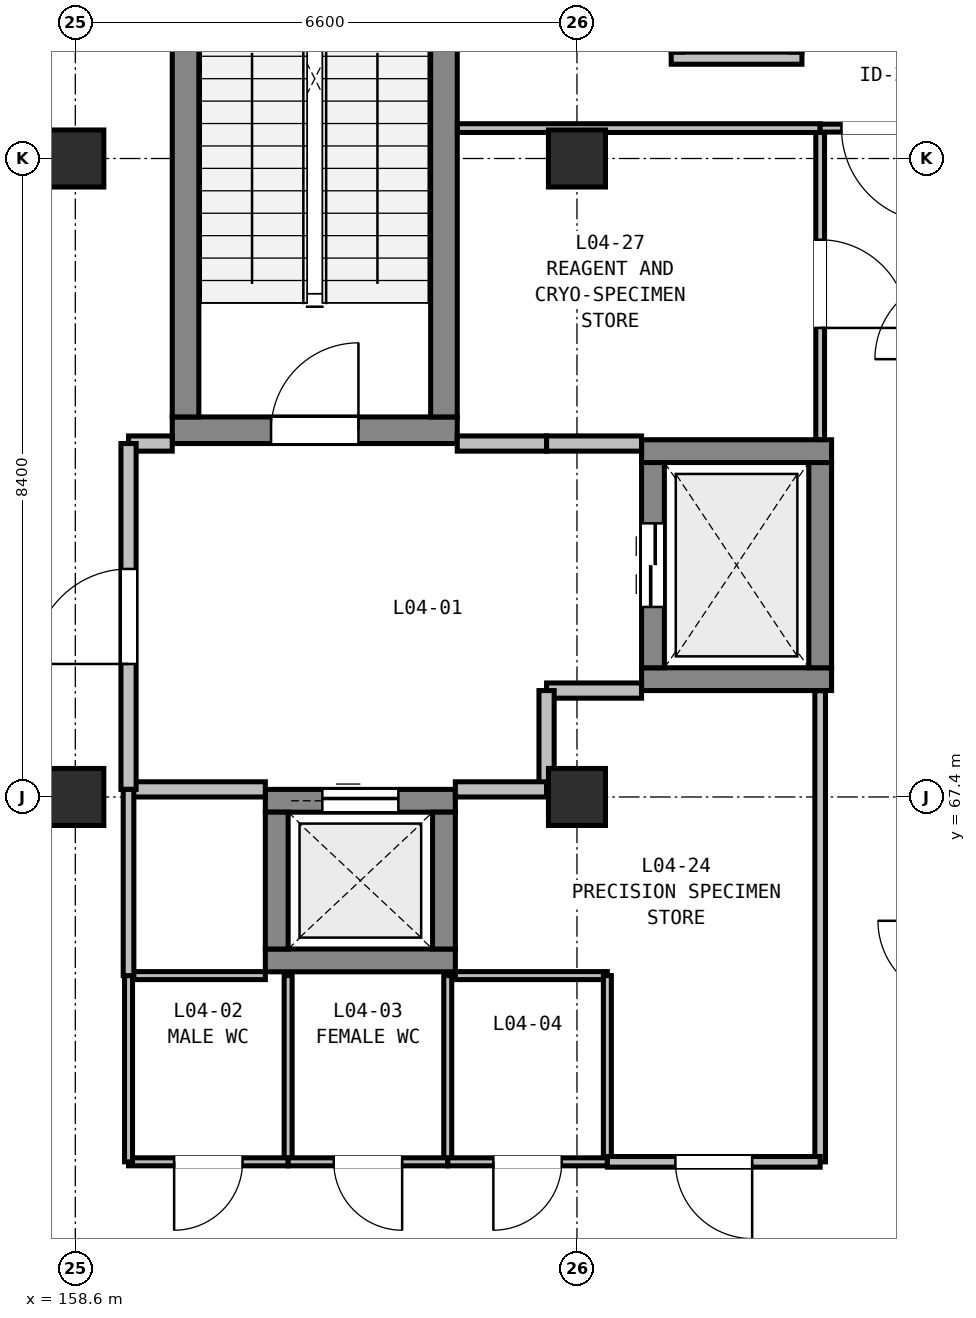
"""IFC4 building model, lengths in metres.
Left out: names, types, materials, properties, quantities, classifications, styles, units other than length and angle.
Written with IfcOpenShell. Run it as: python <this file> out.ifc"""

import sys

from ifc_helpers import new_model, si_unit, direction, frame, frame_2d, origin, origin_2d, place, context, subcontext, project, spatial, rectangle, extrude, element, fill, save


model = new_model("IFC4")
c1 = context("Model", 3, precision=1e-05, world=origin(), true_north=direction((0.0, 1.0)))
c2 = subcontext(c1, "Body", "Model", "MODEL_VIEW")
j1 = project(units=[si_unit("LENGTHUNIT", "METRE"), si_unit("PLANEANGLEUNIT", "RADIAN")], contexts=[c1])
p1 = place(None, origin())
s1 = spatial("IfcSite", under=j1, at=p1, CompositionType="ELEMENT")
p2 = place(p1, origin())
s2 = spatial("IfcBuilding", under=s1, at=p2, CompositionType="ELEMENT")
p3 = place(p2, frame((0.0, 0.0, 19.5)))
s3 = spatial("IfcBuildingStorey", under=s2, at=p3, CompositionType="ELEMENT", Elevation=19.5)
for number, where, z_axis, x_axis in (
    (1, (158.6, 67.4, 0.0), (0.0, 0.0, 1.0), (1.0, 0.0, 0.0)),
    (2, (158.6, 75.8, 0.0), (0.0, 0.0, 1.0), (1.0, 0.0, 0.0)),
    (3, (165.2, 67.4, 0.0), (0.0, 0.0, 1.0), (1.0, 0.0, 0.0)),
    (4, (165.2, 75.8, 0.0), (0.0, 0.0, 1.0), (1.0, 0.0, 0.0)),
):
    element("IfcColumn", number, at=place(p3, frame(where, z_axis=z_axis, x_axis=x_axis)), inside=s3, PredefinedType="COLUMN", context=c2, shape_type="SweptSolid", body=[
        extrude(rectangle(XDim=0.75, YDim=0.75, at=origin_2d()), origin(), (0.0, 0.0, 1.0), 4.5),
    ])
p4 = place(p3, frame((159.875, 72.225, 0.0), z_axis=(0.0, 0.0, 1.0), x_axis=(1.0, 0.0, 0.0)))
e5 = element("IfcWall", 5, at=p4, inside=s3, PredefinedType="SHEAR", context=c2, shape_type="SweptSolid", body=[
    extrude(rectangle(XDim=3.75, YDim=0.35, at=frame_2d((1.875, 0.0))), origin(), (0.0, 0.0, 1.0), 4.5),
])
p5 = place(p4, frame((1.3, 0.0, 0.0)))
e6 = element("IfcOpeningElement", 6, at=p5, cuts=e5, PredefinedType="OPENING", context=c2, shape_type="SweptSolid", body=[
    extrude(rectangle(XDim=1.15, YDim=2.15, at=frame_2d((0.575, 1.075))), frame((0.0, 0.185, 0.0), z_axis=(0.0, -1.0, 0.0), x_axis=(1.0, 0.0, 0.0)), (0.0, 0.0, 1.0), 0.37),
])
for number, where, z_axis, x_axis in (
    (7, (160.05, 72.4, 0.0), (0.0, 0.0, 1.0), (0.0, 1.0, 0.0)),
    (8, (163.45, 72.4, 0.0), (0.0, 0.0, 1.0), (0.0, 1.0, 0.0)),
):
    element("IfcWall", number, at=place(p3, frame(where, z_axis=z_axis, x_axis=x_axis)), inside=s3, PredefinedType="SHEAR", context=c2, shape_type="SweptSolid", body=[
        extrude(rectangle(XDim=7.375, YDim=0.35, at=frame_2d((3.688, 0.0))), origin(), (0.0, 0.0, 1.0), 4.5),
    ])
for number, where, z_axis, x_axis in (
    (9, (166.05, 68.95, 0.0), (0.0, 0.0, 1.0), (1.0, 0.0, 0.0)),
    (10, (166.05, 71.95, 0.0), (0.0, 0.0, 1.0), (1.0, 0.0, 0.0)),
):
    element("IfcWall", number, at=place(p3, frame(where, z_axis=z_axis, x_axis=x_axis)), inside=s3, PredefinedType="SHEAR", context=c2, shape_type="SweptSolid", body=[
        extrude(rectangle(XDim=2.5, YDim=0.3, at=frame_2d((1.25, 0.0))), origin(), (0.0, 0.0, 1.0), 4.5),
    ])
p6 = place(p3, frame((166.2, 69.1, 0.0), z_axis=(0.0, 0.0, 1.0), x_axis=(0.0, 1.0, 0.0)))
e11 = element("IfcWall", 11, at=p6, inside=s3, PredefinedType="SHEAR", context=c2, shape_type="SweptSolid", body=[
    extrude(rectangle(XDim=2.7, YDim=0.3, at=frame_2d((1.35, 0.0))), origin(), (0.0, 0.0, 1.0), 4.5),
])
p7 = place(p6, frame((0.8, 0.0, 0.0)))
e12 = element("IfcOpeningElement", 12, at=p7, cuts=e11, PredefinedType="OPENING", context=c2, shape_type="SweptSolid", body=[
    extrude(rectangle(XDim=1.1, YDim=2.1, at=frame_2d((0.55, 1.05))), frame((0.0, 0.16, 0.0), z_axis=(0.0, -1.0, 0.0), x_axis=(1.0, 0.0, 0.0)), (0.0, 0.0, 1.0), 0.32),
])
p8 = place(p3, frame((168.4, 69.1, 0.0), z_axis=(0.0, 0.0, 1.0), x_axis=(0.0, 1.0, 0.0)))
e13 = element("IfcWall", 13, at=p8, inside=s3, PredefinedType="SHEAR", context=c2, shape_type="SweptSolid", body=[
    extrude(rectangle(XDim=2.7, YDim=0.3, at=frame_2d((1.35, 0.0))), origin(), (0.0, 0.0, 1.0), 4.5),
])
p9 = place(p3, frame((161.1, 65.25, 0.0), z_axis=(0.0, 0.0, 1.0), x_axis=(1.0, 0.0, 0.0)))
e14 = element("IfcWall", 14, at=p9, inside=s3, PredefinedType="SHEAR", context=c2, shape_type="SweptSolid", body=[
    extrude(rectangle(XDim=2.5, YDim=0.3, at=frame_2d((1.25, 0.0))), origin(), (0.0, 0.0, 1.0), 4.5),
])
p10 = place(p3, frame((161.1, 67.35, 0.0), z_axis=(0.0, 0.0, 1.0), x_axis=(1.0, 0.0, 0.0)))
e15 = element("IfcWall", 15, at=p10, inside=s3, PredefinedType="SHEAR", context=c2, shape_type="SweptSolid", body=[
    extrude(rectangle(XDim=2.5, YDim=0.3, at=frame_2d((1.25, 0.0))), origin(), (0.0, 0.0, 1.0), 4.5),
])
p11 = place(p10, frame((0.75, 0.0, 0.0)))
e16 = element("IfcOpeningElement", 16, at=p11, cuts=e15, PredefinedType="OPENING", context=c2, shape_type="SweptSolid", body=[
    extrude(rectangle(XDim=1.0, YDim=2.1, at=frame_2d((0.5, 1.05))), frame((0.0, 0.16, 0.0), z_axis=(0.0, -1.0, 0.0), x_axis=(1.0, 0.0, 0.0)), (0.0, 0.0, 1.0), 0.32),
])
for number, where, z_axis, x_axis in (
    (17, (161.25, 65.4, 0.0), (0.0, 0.0, 1.0), (0.0, 1.0, 0.0)),
    (18, (163.45, 65.4, 0.0), (0.0, 0.0, 1.0), (0.0, 1.0, 0.0)),
):
    element("IfcWall", number, at=place(p3, frame(where, z_axis=z_axis, x_axis=x_axis)), inside=s3, PredefinedType="SHEAR", context=c2, shape_type="SweptSolid", body=[
        extrude(rectangle(XDim=1.8, YDim=0.3, at=frame_2d((0.9, 0.0))), origin(), (0.0, 0.0, 1.0), 4.5),
    ])
p12 = place(p3, frame((166.44, 77.12, 0.0), z_axis=(0.0, 0.0, 1.0), x_axis=(1.0, 0.0, 0.0)))
e19 = element("IfcWall", 19, at=p12, inside=s3, PredefinedType="PARTITIONING", context=c2, shape_type="SweptSolid", body=[
    extrude(rectangle(XDim=1.72, YDim=0.16, at=frame_2d((0.86, 0.0))), origin(), (0.0, 0.0, 1.0), 4.195),
])
p13 = place(p3, frame((159.3, 72.05, 0.0), z_axis=(0.0, 0.0, 1.0), x_axis=(1.0, 0.0, 0.0)))
e20 = element("IfcWall", 20, at=p13, inside=s3, PredefinedType="PARTITIONING", context=c2, shape_type="SweptSolid", body=[
    extrude(rectangle(XDim=0.575, YDim=0.2, at=frame_2d((0.288, 0.0))), origin(), (0.0, 0.0, 1.0), 4.195),
])
p14 = place(p3, frame((163.625, 72.05, 0.0), z_axis=(0.0, 0.0, 1.0), x_axis=(1.0, 0.0, 0.0)))
e21 = element("IfcWall", 21, at=p14, inside=s3, PredefinedType="PARTITIONING", context=c2, shape_type="SweptSolid", body=[
    extrude(rectangle(XDim=1.175, YDim=0.2, at=frame_2d((0.587, 0.0))), origin(), (0.0, 0.0, 1.0), 4.195),
])
for number, where, z_axis, x_axis in (
    (22, (164.8, 72.05, 0.0), (0.0, 0.0, 1.0), (1.0, 0.0, 0.0)),
    (23, (166.05, 68.8, 0.0), (0.0, 0.0, 1.0), (-1.0, 0.0, 0.0)),
):
    element("IfcWall", number, at=place(p3, frame(where, z_axis=z_axis, x_axis=x_axis)), inside=s3, PredefinedType="PARTITIONING", context=c2, shape_type="SweptSolid", body=[
        extrude(rectangle(XDim=1.25, YDim=0.2, at=frame_2d((0.625, 0.0))), origin(), (0.0, 0.0, 1.0), 3.735),
    ])
p15 = place(p3, frame((164.8, 68.8, 0.0), z_axis=(0.0, 0.0, 1.0), x_axis=(0.0, -1.0, 0.0)))
e24 = element("IfcWall", 24, at=p15, inside=s3, PredefinedType="PARTITIONING", context=c2, shape_type="SweptSolid", body=[
    extrude(rectangle(XDim=1.3, YDim=0.2, at=frame_2d((0.65, 0.0))), origin(), (0.0, 0.0, 1.0), 3.885),
])
p16 = place(p3, frame((164.8, 67.5, 0.0), z_axis=(0.0, 0.0, 1.0), x_axis=(-1.0, 0.0, 0.0)))
e25 = element("IfcWall", 25, at=p16, inside=s3, PredefinedType="PARTITIONING", context=c2, shape_type="SweptSolid", body=[
    extrude(rectangle(XDim=1.2, YDim=0.2, at=frame_2d((0.6, 0.0))), origin(), (0.0, 0.0, 1.0), 3.885),
])
p17 = place(p3, frame((161.1, 67.5, 0.0), z_axis=(0.0, 0.0, 1.0), x_axis=(-1.0, 0.0, 0.0)))
e26 = element("IfcWall", 26, at=p17, inside=s3, PredefinedType="PARTITIONING", context=c2, shape_type="SweptSolid", body=[
    extrude(rectangle(XDim=1.8, YDim=0.2, at=frame_2d((0.9, 0.0))), origin(), (0.0, 0.0, 1.0), 3.885),
])
p18 = place(p3, frame((159.3, 67.5, 0.0), z_axis=(0.0, 0.0, 1.0), x_axis=(0.0, 1.0, 0.0)))
e27 = element("IfcWall", 27, at=p18, inside=s3, PredefinedType="PARTITIONING", context=c2, shape_type="SweptSolid", body=[
    extrude(rectangle(XDim=4.55, YDim=0.2, at=frame_2d((2.275, 0.0))), origin(), (0.0, 0.0, 1.0), 3.885),
])
p19 = place(p18, frame((1.65, 0.0, 0.0)))
e28 = element("IfcOpeningElement", 28, at=p19, cuts=e27, PredefinedType="OPENING", context=c2, shape_type="SweptSolid", body=[
    extrude(rectangle(XDim=1.25, YDim=2.15, at=frame_2d((0.625, 1.075))), frame((0.0, 0.11, 0.0), z_axis=(0.0, -1.0, 0.0), x_axis=(1.0, 0.0, 0.0)), (0.0, 0.0, 1.0), 0.22),
])
p20 = place(p3, frame((159.3, 65.05, 0.0), z_axis=(0.0, 0.0, 1.0), x_axis=(1.0, 0.0, 0.0)))
e29 = element("IfcWall", 29, at=p20, inside=s3, PredefinedType="PARTITIONING", context=c2, shape_type="SweptSolid", body=[
    extrude(rectangle(XDim=1.8, YDim=0.105, at=frame_2d((0.9, 0.0))), origin(), (0.0, 0.0, 1.0), 4.195),
])
p21 = place(p3, frame((161.4, 65.05, 0.0), z_axis=(0.0, 0.0, 1.0), x_axis=(0.0, -1.0, 0.0)))
e30 = element("IfcWall", 30, at=p21, inside=s3, PredefinedType="PARTITIONING", context=c2, shape_type="SweptSolid", body=[
    extrude(rectangle(XDim=2.45, YDim=0.105, at=frame_2d((1.225, 0.0))), origin(), (0.0, 0.0, 1.0), 4.195),
])
p22 = place(p3, frame((161.4, 62.6, 0.0), z_axis=(0.0, 0.0, 1.0), x_axis=(-1.0, 0.0, 0.0)))
e31 = element("IfcWall", 31, at=p22, inside=s3, PredefinedType="PARTITIONING", context=c2, shape_type="SweptSolid", body=[
    extrude(rectangle(XDim=2.1, YDim=0.105, at=frame_2d((1.05, 0.0))), origin(), (0.0, 0.0, 1.0), 4.195),
])
p23 = place(p22, frame((0.6, 0.0, 0.0)))
e32 = element("IfcOpeningElement", 32, at=p23, cuts=e31, PredefinedType="OPENING", context=c2, shape_type="SweptSolid", body=[
    extrude(rectangle(XDim=0.9, YDim=2.02, at=frame_2d((0.45, 1.01))), frame((0.0, 0.062, 0.0), z_axis=(0.0, -1.0, 0.0), x_axis=(1.0, 0.0, 0.0)), (0.0, 0.0, 1.0), 0.125),
])
for number, where, z_axis, x_axis in (
    (33, (159.3, 62.6, 0.0), (0.0, 0.0, 1.0), (0.0, 1.0, 0.0)),
    (34, (163.5, 65.05, 0.0), (0.0, 0.0, 1.0), (0.0, -1.0, 0.0)),
):
    element("IfcWall", number, at=place(p3, frame(where, z_axis=z_axis, x_axis=x_axis)), inside=s3, PredefinedType="PARTITIONING", context=c2, shape_type="SweptSolid", body=[
        extrude(rectangle(XDim=2.45, YDim=0.105, at=frame_2d((1.225, 0.0))), origin(), (0.0, 0.0, 1.0), 4.195),
    ])
p24 = place(p3, frame((163.5, 62.6, 0.0), z_axis=(0.0, 0.0, 1.0), x_axis=(-1.0, 0.0, 0.0)))
e35 = element("IfcWall", 35, at=p24, inside=s3, PredefinedType="PARTITIONING", context=c2, shape_type="SweptSolid", body=[
    extrude(rectangle(XDim=2.1, YDim=0.105, at=frame_2d((1.05, 0.0))), origin(), (0.0, 0.0, 1.0), 4.195),
])
p25 = place(p24, frame((0.6, 0.0, 0.0)))
e36 = element("IfcOpeningElement", 36, at=p25, cuts=e35, PredefinedType="OPENING", context=c2, shape_type="SweptSolid", body=[
    extrude(rectangle(XDim=0.9, YDim=2.02, at=frame_2d((0.45, 1.01))), frame((0.0, 0.062, 0.0), z_axis=(0.0, -1.0, 0.0), x_axis=(1.0, 0.0, 0.0)), (0.0, 0.0, 1.0), 0.125),
])
p26 = place(p3, frame((163.6, 65.05, 0.0), z_axis=(0.0, 0.0, 1.0), x_axis=(1.0, 0.0, 0.0)))
e37 = element("IfcWall", 37, at=p26, inside=s3, PredefinedType="PARTITIONING", context=c2, shape_type="SweptSolid", body=[
    extrude(rectangle(XDim=2.0, YDim=0.105, at=frame_2d((1.0, 0.0))), origin(), (0.0, 0.0, 1.0), 3.735),
])
p27 = place(p3, frame((165.6, 65.05, 0.0), z_axis=(0.0, 0.0, 1.0), x_axis=(0.0, -1.0, 0.0)))
e38 = element("IfcWall", 38, at=p27, inside=s3, PredefinedType="PARTITIONING", context=c2, shape_type="SweptSolid", body=[
    extrude(rectangle(XDim=2.45, YDim=0.105, at=frame_2d((1.225, 0.0))), origin(), (0.0, 0.0, 1.0), 4.195),
])
p28 = place(p3, frame((165.6, 62.6, 0.0), z_axis=(0.0, 0.0, 1.0), x_axis=(-1.0, 0.0, 0.0)))
e39 = element("IfcWall", 39, at=p28, inside=s3, PredefinedType="PARTITIONING", context=c2, shape_type="SweptSolid", body=[
    extrude(rectangle(XDim=2.1, YDim=0.105, at=frame_2d((1.05, 0.0))), origin(), (0.0, 0.0, 1.0), 3.735),
])
p29 = place(p28, frame((0.6, 0.0, 0.0)))
e40 = element("IfcOpeningElement", 40, at=p29, cuts=e39, PredefinedType="OPENING", context=c2, shape_type="SweptSolid", body=[
    extrude(rectangle(XDim=0.9, YDim=2.02, at=frame_2d((0.45, 1.01))), frame((0.0, 0.062, 0.0), z_axis=(0.0, -1.0, 0.0), x_axis=(1.0, 0.0, 0.0)), (0.0, 0.0, 1.0), 0.125),
])
p30 = place(p3, frame((168.4, 68.798, 0.0), z_axis=(0.0, 0.0, 1.0), x_axis=(0.0, -1.0, 0.0)))
e41 = element("IfcWall", 41, at=p30, inside=s3, PredefinedType="PARTITIONING", context=c2, shape_type="SweptSolid", body=[
    extrude(rectangle(XDim=6.198, YDim=0.14, at=frame_2d((3.099, 0.0))), origin(), (0.0, 0.0, 1.0), 3.885),
])
p31 = place(p3, frame((168.4, 62.6, 0.0), z_axis=(0.0, 0.0, 1.0), x_axis=(-1.0, 0.0, 0.0)))
e42 = element("IfcWall", 42, at=p31, inside=s3, PredefinedType="PARTITIONING", context=c2, shape_type="SweptSolid", body=[
    extrude(rectangle(XDim=2.8, YDim=0.14, at=frame_2d((1.4, 0.0))), origin(), (0.0, 0.0, 1.0), 3.985),
])
p32 = place(p31, frame((0.895, 0.0, 0.0)))
e43 = element("IfcOpeningElement", 43, at=p32, cuts=e42, PredefinedType="OPENING", context=c2, shape_type="SweptSolid", body=[
    extrude(rectangle(XDim=1.01, YDim=2.14, at=frame_2d((0.505, 1.07))), frame((0.0, 0.08, 0.0), z_axis=(0.0, -1.0, 0.0), x_axis=(1.0, 0.0, 0.0)), (0.0, 0.0, 1.0), 0.16),
])
p33 = place(p3, frame((159.3, 65.05, 0.0), z_axis=(0.0, 0.0, 1.0), x_axis=(0.0, 1.0, 0.0)))
e44 = element("IfcWall", 44, at=p33, inside=s3, PredefinedType="PARTITIONING", context=c2, shape_type="SweptSolid", body=[
    extrude(rectangle(XDim=2.45, YDim=0.14, at=frame_2d((1.225, 0.0))), origin(), (0.0, 0.0, 1.0), 3.885),
])
p34 = place(p3, frame((168.4, 76.2, 0.0), z_axis=(0.0, 0.0, 1.0), x_axis=(0.0, -1.0, 0.0)))
e45 = element("IfcWall", 45, at=p34, inside=s3, PredefinedType="PARTITIONING", context=c2, shape_type="SweptSolid", body=[
    extrude(rectangle(XDim=4.098, YDim=0.115, at=frame_2d((2.049, 0.0))), origin(), (0.0, 0.0, 1.0), 3.885),
])
p35 = place(p34, frame((1.469, 0.0, 0.0)))
e46 = element("IfcOpeningElement", 46, at=p35, cuts=e45, PredefinedType="OPENING", context=c2, shape_type="SweptSolid", body=[
    extrude(rectangle(XDim=1.16, YDim=2.14, at=frame_2d((0.58, 1.07))), frame((0.0, 0.067, 0.0), z_axis=(0.0, -1.0, 0.0), x_axis=(1.0, 0.0, 0.0)), (0.0, 0.0, 1.0), 0.135),
])
p36 = place(p3, frame((163.627, 76.2, 0.0), z_axis=(0.0, 0.0, 1.0), x_axis=(1.0, 0.0, 0.0)))
e47 = element("IfcWall", 47, at=p36, inside=s3, PredefinedType="PARTITIONING", context=c2, shape_type="SweptSolid", body=[
    extrude(rectangle(XDim=4.773, YDim=0.115, at=frame_2d((2.386, 0.0))), origin(), (0.0, 0.0, 1.0), 3.735),
])
p37 = place(p3, frame((170.2, 76.2, 0.0), z_axis=(0.0, 0.0, 1.0), x_axis=(-1.0, 0.0, 0.0)))
e48 = element("IfcWall", 48, at=p37, inside=s3, PredefinedType="PARTITIONING", context=c2, shape_type="SweptSolid", body=[
    extrude(rectangle(XDim=1.8, YDim=0.105, at=frame_2d((0.9, 0.0))), origin(), (0.0, 0.0, 1.0), 3.985),
])
p38 = place(p37, frame((0.28, 0.0, 0.0)))
e49 = element("IfcOpeningElement", 49, at=p38, cuts=e48, PredefinedType="OPENING", context=c2, shape_type="SweptSolid", body=[
    extrude(rectangle(XDim=1.24, YDim=2.14, at=frame_2d((0.62, 1.07))), frame((0.0, 0.062, 0.0), z_axis=(0.0, -1.0, 0.0), x_axis=(1.0, 0.0, 0.0)), (0.0, 0.0, 1.0), 0.125),
])
p39 = place(p5, origin())
e50 = element("IfcDoor", 50, at=p39, inside=s3, OperationType="SINGLE_SWING_RIGHT", PredefinedType="DOOR", context=c2, shape_type="SweptSolid", body=[
    extrude(rectangle(XDim=1.15, YDim=2.15, at=frame_2d((0.575, 1.075))), frame((0.0, 0.025, 0.0), z_axis=(0.0, -1.0, 0.0), x_axis=(1.0, 0.0, 0.0)), (0.0, 0.0, 1.0), 0.05),
])
fill(e6, e50)
p40 = place(p7, origin())
e51 = element("IfcDoor", 51, at=p40, inside=s3, OperationType="DOUBLE_DOOR_SLIDING", PredefinedType="DOOR", context=c2, shape_type="SweptSolid", body=[
    extrude(rectangle(XDim=1.1, YDim=2.1, at=frame_2d((0.55, 1.05))), frame((0.0, 0.025, 0.0), z_axis=(0.0, -1.0, 0.0), x_axis=(1.0, 0.0, 0.0)), (0.0, 0.0, 1.0), 0.05),
])
fill(e12, e51)
p41 = place(p11, origin())
e52 = element("IfcDoor", 52, at=p41, inside=s3, OperationType="SLIDING_TO_LEFT", PredefinedType="DOOR", context=c2, shape_type="SweptSolid", body=[
    extrude(rectangle(XDim=1.0, YDim=2.1, at=frame_2d((0.5, 1.05))), frame((0.0, 0.025, 0.0), z_axis=(0.0, -1.0, 0.0), x_axis=(1.0, 0.0, 0.0)), (0.0, 0.0, 1.0), 0.05),
])
fill(e16, e52)
p42 = place(p19, origin())
e53 = element("IfcDoor", 53, at=p42, inside=s3, OperationType="SINGLE_SWING_LEFT", PredefinedType="DOOR", context=c2, shape_type="SweptSolid", body=[
    extrude(rectangle(XDim=1.25, YDim=2.15, at=frame_2d((0.625, 1.075))), frame((0.0, 0.025, 0.0), z_axis=(0.0, -1.0, 0.0), x_axis=(1.0, 0.0, 0.0)), (0.0, 0.0, 1.0), 0.05),
])
fill(e28, e53)
p43 = place(p23, origin())
e54 = element("IfcDoor", 54, at=p43, inside=s3, OperationType="SINGLE_SWING_RIGHT", PredefinedType="DOOR", context=c2, shape_type="SweptSolid", body=[
    extrude(rectangle(XDim=0.9, YDim=2.02, at=frame_2d((0.45, 1.01))), frame((0.0, 0.025, 0.0), z_axis=(0.0, -1.0, 0.0), x_axis=(1.0, 0.0, 0.0)), (0.0, 0.0, 1.0), 0.05),
])
fill(e32, e54)
p44 = place(p25, origin())
e55 = element("IfcDoor", 55, at=p44, inside=s3, OperationType="SINGLE_SWING_LEFT", PredefinedType="DOOR", context=c2, shape_type="SweptSolid", body=[
    extrude(rectangle(XDim=0.9, YDim=2.02, at=frame_2d((0.45, 1.01))), frame((0.0, 0.025, 0.0), z_axis=(0.0, -1.0, 0.0), x_axis=(1.0, 0.0, 0.0)), (0.0, 0.0, 1.0), 0.05),
])
fill(e36, e55)
p45 = place(p29, origin())
e56 = element("IfcDoor", 56, at=p45, inside=s3, OperationType="SINGLE_SWING_RIGHT", PredefinedType="DOOR", context=c2, shape_type="SweptSolid", body=[
    extrude(rectangle(XDim=0.9, YDim=2.02, at=frame_2d((0.45, 1.01))), frame((0.0, 0.025, 0.0), z_axis=(0.0, -1.0, 0.0), x_axis=(1.0, 0.0, 0.0)), (0.0, 0.0, 1.0), 0.05),
])
fill(e40, e56)
p46 = place(p32, origin())
e57 = element("IfcDoor", 57, at=p46, inside=s3, OperationType="SINGLE_SWING_LEFT", PredefinedType="DOOR", context=c2, shape_type="SweptSolid", body=[
    extrude(rectangle(XDim=1.01, YDim=2.14, at=frame_2d((0.505, 1.07))), frame((0.0, 0.025, 0.0), z_axis=(0.0, -1.0, 0.0), x_axis=(1.0, 0.0, 0.0)), (0.0, 0.0, 1.0), 0.05),
])
fill(e43, e57)
p47 = place(p35, origin())
e58 = element("IfcDoor", 58, at=p47, inside=s3, OperationType="SINGLE_SWING_RIGHT", PredefinedType="DOOR", context=c2, shape_type="SweptSolid", body=[
    extrude(rectangle(XDim=1.16, YDim=2.14, at=frame_2d((0.58, 1.07))), frame((0.0, 0.025, 0.0), z_axis=(0.0, -1.0, 0.0), x_axis=(1.0, 0.0, 0.0)), (0.0, 0.0, 1.0), 0.05),
])
fill(e46, e58)
p48 = place(p38, origin())
e59 = element("IfcDoor", 59, at=p48, inside=s3, OperationType="SINGLE_SWING_LEFT", PredefinedType="DOOR", context=c2, shape_type="SweptSolid", body=[
    extrude(rectangle(XDim=1.24, YDim=2.14, at=frame_2d((0.62, 1.07))), frame((0.0, 0.025, 0.0), z_axis=(0.0, -1.0, 0.0), x_axis=(1.0, 0.0, 0.0)), (0.0, 0.0, 1.0), 0.05),
])
fill(e49, e59)
save(model, sys.argv[1])
